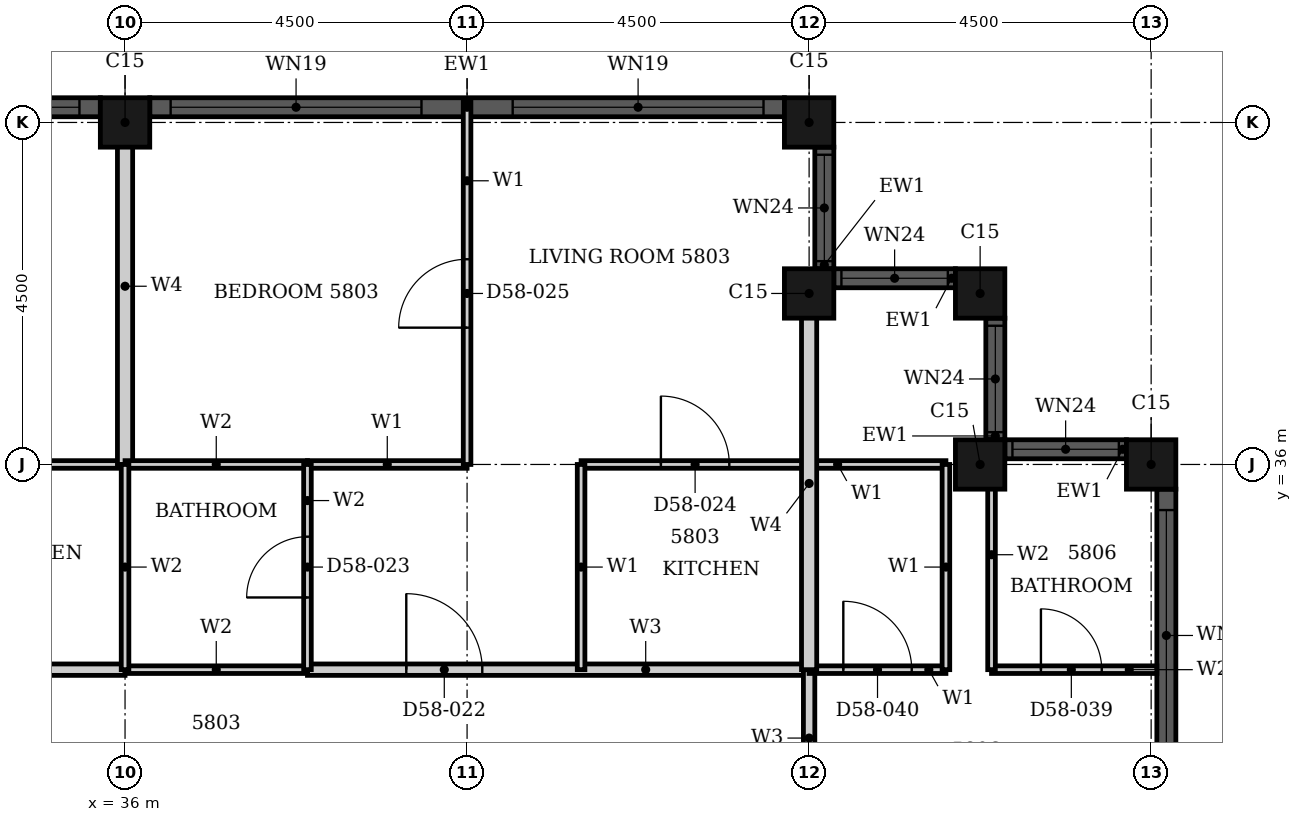
"""IFC4 building model, lengths in metres.
Left out: names, types, materials, properties, quantities, classifications, styles, units other than length and angle.
Written with IfcOpenShell. Run it as: python <this file> out.ifc"""

import sys

from ifc_helpers import new_model, si_unit, direction, frame, frame_2d, origin, origin_2d, place, context, subcontext, project, spatial, rectangle, hollow_rectangle, extrude, element, fill, save


model = new_model("IFC4")
c1 = context("Model", 3, precision=1e-05, world=origin(), true_north=direction((0.0, 1.0)))
c2 = subcontext(c1, "Body", "Model", "MODEL_VIEW")
j1 = project(units=[si_unit("LENGTHUNIT", "METRE"), si_unit("PLANEANGLEUNIT", "RADIAN")], contexts=[c1])
p1 = place(None, origin())
s1 = spatial("IfcSite", under=j1, at=p1, CompositionType="ELEMENT")
p2 = place(p1, origin())
s2 = spatial("IfcBuilding", under=s1, at=p2, CompositionType="ELEMENT")
p3 = place(p2, frame((0.0, 0.0, 229.4)))
s3 = spatial("IfcBuildingStorey", under=s2, at=p3, CompositionType="ELEMENT", Elevation=229.4)
for number, where, z_axis, x_axis in (
    (1, (49.5, 36.0, 0.0), (0.0, 0.0, 1.0), (1.0, 0.0, 0.0)),
    (2, (47.25, 36.0, 0.0), (0.0, 0.0, 1.0), (1.0, 0.0, 0.0)),
    (3, (47.25, 38.25, 0.0), (0.0, 0.0, 1.0), (1.0, 0.0, 0.0)),
    (4, (45.0, 38.25, 0.0), (0.0, 0.0, 1.0), (1.0, 0.0, 0.0)),
    (5, (45.0, 40.5, 0.0), (0.0, 0.0, 1.0), (1.0, 0.0, 0.0)),
    (6, (36.0, 40.5, 0.0), (0.0, 0.0, 1.0), (1.0, 0.0, 0.0)),
):
    element("IfcColumn", number, at=place(p3, frame(where, z_axis=z_axis, x_axis=x_axis)), inside=s3, PredefinedType="COLUMN", context=c2, shape_type="SweptSolid", body=[
        extrude(hollow_rectangle(XDim=0.65, YDim=0.65, WallThickness=0.021, at=origin_2d()), origin(), (0.0, 0.0, 1.0), 3.7),
    ])
p4 = place(p3, frame((49.7, 27.325, 0.0), z_axis=(0.0, 0.0, 1.0), x_axis=(0.0, 1.0, 0.0)))
e7 = element("IfcWall", 7, at=p4, inside=s3, PredefinedType="SOLIDWALL", context=c2, shape_type="SweptSolid", body=[
    extrude(rectangle(XDim=8.35, YDim=0.25, at=frame_2d((4.175, 0.0))), origin(), (0.0, 0.0, 1.0), 3.7),
])
p5 = place(p4, frame((0.275, 0.0, 0.45)))
e8 = element("IfcOpeningElement", 8, at=p5, cuts=e7, PredefinedType="OPENING", context=c2, shape_type="SweptSolid", body=[
    extrude(rectangle(XDim=3.3, YDim=2.2, at=frame_2d((1.65, 1.1))), frame((0.0, 0.135, 0.0), z_axis=(0.0, -1.0, 0.0), x_axis=(1.0, 0.0, 0.0)), (0.0, 0.0, 1.0), 0.27),
])
p6 = place(p4, frame((4.775, 0.0, 0.45)))
e9 = element("IfcOpeningElement", 9, at=p6, cuts=e7, PredefinedType="OPENING", context=c2, shape_type="SweptSolid", body=[
    extrude(rectangle(XDim=3.3, YDim=2.2, at=frame_2d((1.65, 1.1))), frame((0.0, 0.135, 0.0), z_axis=(0.0, -1.0, 0.0), x_axis=(1.0, 0.0, 0.0)), (0.0, 0.0, 1.0), 0.27),
])
p7 = place(p3, frame((49.175, 36.2, 0.0), z_axis=(0.0, 0.0, 1.0), x_axis=(-1.0, 0.0, 0.0)))
e10 = element("IfcWall", 10, at=p7, inside=s3, PredefinedType="SOLIDWALL", context=c2, shape_type="SweptSolid", body=[
    extrude(rectangle(XDim=1.6, YDim=0.25, at=frame_2d((0.8, 0.0))), origin(), (0.0, 0.0, 1.0), 3.7),
])
p8 = place(p7, frame((0.1, 0.0, 0.9)))
e11 = element("IfcOpeningElement", 11, at=p8, cuts=e10, PredefinedType="OPENING", context=c2, shape_type="SweptSolid", body=[
    extrude(rectangle(XDim=1.4, YDim=1.75, at=frame_2d((0.7, 0.875))), frame((0.0, 0.135, 0.0), z_axis=(0.0, -1.0, 0.0), x_axis=(1.0, 0.0, 0.0)), (0.0, 0.0, 1.0), 0.27),
])
p9 = place(p3, frame((47.45, 36.325, 0.0), z_axis=(0.0, 0.0, 1.0), x_axis=(0.0, 1.0, 0.0)))
e12 = element("IfcWall", 12, at=p9, inside=s3, PredefinedType="SOLIDWALL", context=c2, shape_type="SweptSolid", body=[
    extrude(rectangle(XDim=1.6, YDim=0.25, at=frame_2d((0.8, 0.0))), origin(), (0.0, 0.0, 1.0), 3.7),
])
p10 = place(p9, frame((0.1, 0.0, 0.9)))
e13 = element("IfcOpeningElement", 13, at=p10, cuts=e12, PredefinedType="OPENING", context=c2, shape_type="SweptSolid", body=[
    extrude(rectangle(XDim=1.4, YDim=1.75, at=frame_2d((0.7, 0.875))), frame((0.0, 0.135, 0.0), z_axis=(0.0, -1.0, 0.0), x_axis=(1.0, 0.0, 0.0)), (0.0, 0.0, 1.0), 0.27),
])
p11 = place(p3, frame((46.925, 38.45, 0.0), z_axis=(0.0, 0.0, 1.0), x_axis=(-1.0, 0.0, 0.0)))
e14 = element("IfcWall", 14, at=p11, inside=s3, PredefinedType="SOLIDWALL", context=c2, shape_type="SweptSolid", body=[
    extrude(rectangle(XDim=1.6, YDim=0.25, at=frame_2d((0.8, 0.0))), origin(), (0.0, 0.0, 1.0), 3.7),
])
p12 = place(p11, frame((0.1, 0.0, 0.9)))
e15 = element("IfcOpeningElement", 15, at=p12, cuts=e14, PredefinedType="OPENING", context=c2, shape_type="SweptSolid", body=[
    extrude(rectangle(XDim=1.4, YDim=1.75, at=frame_2d((0.7, 0.875))), frame((0.0, 0.135, 0.0), z_axis=(0.0, -1.0, 0.0), x_axis=(1.0, 0.0, 0.0)), (0.0, 0.0, 1.0), 0.27),
])
p13 = place(p3, frame((45.2, 38.575, 0.0), z_axis=(0.0, 0.0, 1.0), x_axis=(0.0, 1.0, 0.0)))
e16 = element("IfcWall", 16, at=p13, inside=s3, PredefinedType="SOLIDWALL", context=c2, shape_type="SweptSolid", body=[
    extrude(rectangle(XDim=1.6, YDim=0.25, at=frame_2d((0.8, 0.0))), origin(), (0.0, 0.0, 1.0), 3.7),
])
p14 = place(p13, frame((0.1, 0.0, 0.9)))
e17 = element("IfcOpeningElement", 17, at=p14, cuts=e16, PredefinedType="OPENING", context=c2, shape_type="SweptSolid", body=[
    extrude(rectangle(XDim=1.4, YDim=1.75, at=frame_2d((0.7, 0.875))), frame((0.0, 0.135, 0.0), z_axis=(0.0, -1.0, 0.0), x_axis=(1.0, 0.0, 0.0)), (0.0, 0.0, 1.0), 0.27),
])
p15 = place(p3, frame((44.675, 40.7, 0.0), z_axis=(0.0, 0.0, 1.0), x_axis=(-1.0, 0.0, 0.0)))
e18 = element("IfcWall", 18, at=p15, inside=s3, PredefinedType="SOLIDWALL", context=c2, shape_type="SweptSolid", body=[
    extrude(rectangle(XDim=8.35, YDim=0.25, at=frame_2d((4.175, 0.0))), origin(), (0.0, 0.0, 1.0), 3.7),
])
p16 = place(p15, frame((0.275, 0.0, 0.45)))
e19 = element("IfcOpeningElement", 19, at=p16, cuts=e18, PredefinedType="OPENING", context=c2, shape_type="SweptSolid", body=[
    extrude(rectangle(XDim=3.3, YDim=2.2, at=frame_2d((1.65, 1.1))), frame((0.0, 0.135, 0.0), z_axis=(0.0, -1.0, 0.0), x_axis=(1.0, 0.0, 0.0)), (0.0, 0.0, 1.0), 0.27),
])
p17 = place(p15, frame((4.775, 0.0, 0.45)))
e20 = element("IfcOpeningElement", 20, at=p17, cuts=e18, PredefinedType="OPENING", context=c2, shape_type="SweptSolid", body=[
    extrude(rectangle(XDim=3.3, YDim=2.2, at=frame_2d((1.65, 1.1))), frame((0.0, 0.135, 0.0), z_axis=(0.0, -1.0, 0.0), x_axis=(1.0, 0.0, 0.0)), (0.0, 0.0, 1.0), 0.27),
])
p18 = place(p3, frame((35.675, 40.7, 0.0), z_axis=(0.0, 0.0, 1.0), x_axis=(-1.0, 0.0, 0.0)))
e21 = element("IfcWall", 21, at=p18, inside=s3, PredefinedType="SOLIDWALL", context=c2, shape_type="SweptSolid", body=[
    extrude(rectangle(XDim=8.35, YDim=0.25, at=frame_2d((4.175, 0.0))), origin(), (0.0, 0.0, 1.0), 3.7),
])
p19 = place(p18, frame((0.275, 0.0, 0.45)))
e22 = element("IfcOpeningElement", 22, at=p19, cuts=e21, PredefinedType="OPENING", context=c2, shape_type="SweptSolid", body=[
    extrude(rectangle(XDim=3.3, YDim=2.2, at=frame_2d((1.65, 1.1))), frame((0.0, 0.135, 0.0), z_axis=(0.0, -1.0, 0.0), x_axis=(1.0, 0.0, 0.0)), (0.0, 0.0, 1.0), 0.27),
])
p20 = place(p18, frame((4.775, 0.0, 0.45)))
e23 = element("IfcOpeningElement", 23, at=p20, cuts=e21, PredefinedType="OPENING", context=c2, shape_type="SweptSolid", body=[
    extrude(rectangle(XDim=3.3, YDim=2.2, at=frame_2d((1.65, 1.1))), frame((0.0, 0.135, 0.0), z_axis=(0.0, -1.0, 0.0), x_axis=(1.0, 0.0, 0.0)), (0.0, 0.0, 1.0), 0.27),
])
p21 = place(p3, frame((29.4, 33.3, 0.0), z_axis=(0.0, 0.0, 1.0), x_axis=(1.0, 0.0, 0.0)))
e24 = element("IfcWall", 24, at=p21, inside=s3, PredefinedType="PARTITIONING", context=c2, shape_type="SweptSolid", body=[
    extrude(rectangle(XDim=6.6, YDim=0.15, at=frame_2d((3.3, 0.0))), origin(), (0.0, 0.0, 1.0), 3.3),
])
p22 = place(p21, frame((1.3, 0.0, 0.0)))
e25 = element("IfcOpeningElement", 25, at=p22, cuts=e24, PredefinedType="OPENING", context=c2, shape_type="SweptSolid", body=[
    extrude(rectangle(XDim=1.0, YDim=2.2, at=frame_2d((0.5, 1.1))), frame((0.0, 0.085, 0.0), z_axis=(0.0, -1.0, 0.0), x_axis=(1.0, 0.0, 0.0)), (0.0, 0.0, 1.0), 0.17),
])
p23 = place(p3, frame((38.4, 33.3, 0.0), z_axis=(0.0, 0.0, 1.0), x_axis=(1.0, 0.0, 0.0)))
e26 = element("IfcWall", 26, at=p23, inside=s3, PredefinedType="PARTITIONING", context=c2, shape_type="SweptSolid", body=[
    extrude(rectangle(XDim=6.6, YDim=0.15, at=frame_2d((3.3, 0.0))), origin(), (0.0, 0.0, 1.0), 3.3),
])
p24 = place(p23, frame((1.3, 0.0, 0.0)))
e27 = element("IfcOpeningElement", 27, at=p24, cuts=e26, PredefinedType="OPENING", context=c2, shape_type="SweptSolid", body=[
    extrude(rectangle(XDim=1.0, YDim=2.2, at=frame_2d((0.5, 1.1))), frame((0.0, 0.085, 0.0), z_axis=(0.0, -1.0, 0.0), x_axis=(1.0, 0.0, 0.0)), (0.0, 0.0, 1.0), 0.17),
])
p25 = place(p3, frame((45.0, 31.5, 0.0), z_axis=(0.0, 0.0, 1.0), x_axis=(0.0, 1.0, 0.0)))
e28 = element("IfcWall", 28, at=p25, inside=s3, PredefinedType="PARTITIONING", context=c2, shape_type="SweptSolid", body=[
    extrude(rectangle(XDim=1.8, YDim=0.15, at=frame_2d((0.9, 0.0))), origin(), (0.0, 0.0, 1.0), 3.3),
])
p26 = place(p3, frame((45.0, 33.3, 0.0), z_axis=(0.0, 0.0, 1.0), x_axis=(1.0, 0.0, 0.0)))
e29 = element("IfcWall", 29, at=p26, inside=s3, PredefinedType="PARTITIONING", context=c2, shape_type="SweptSolid", body=[
    extrude(rectangle(XDim=1.8, YDim=0.1, at=frame_2d((0.9, 0.0))), origin(), (0.0, 0.0, 1.0), 3.3),
])
p27 = place(p26, frame((0.45, 0.0, 0.0)))
e30 = element("IfcOpeningElement", 30, at=p27, cuts=e29, PredefinedType="OPENING", context=c2, shape_type="SweptSolid", body=[
    extrude(rectangle(XDim=0.9, YDim=2.1, at=frame_2d((0.45, 1.05))), frame((0.0, 0.06, 0.0), z_axis=(0.0, -1.0, 0.0), x_axis=(1.0, 0.0, 0.0)), (0.0, 0.0, 1.0), 0.12),
])
p28 = place(p3, frame((33.0, 36.0, 0.0), z_axis=(0.0, 0.0, 1.0), x_axis=(1.0, 0.0, 0.0)))
e31 = element("IfcWall", 31, at=p28, inside=s3, PredefinedType="PARTITIONING", context=c2, shape_type="SweptSolid", body=[
    extrude(rectangle(XDim=3.0, YDim=0.1, at=frame_2d((1.5, 0.0))), origin(), (0.0, 0.0, 1.0), 3.3),
])
p29 = place(p28, frame((1.05, 0.0, 0.0)))
e32 = element("IfcOpeningElement", 32, at=p29, cuts=e31, PredefinedType="OPENING", context=c2, shape_type="SweptSolid", body=[
    extrude(rectangle(XDim=0.9, YDim=2.1, at=frame_2d((0.45, 1.05))), frame((0.0, 0.06, 0.0), z_axis=(0.0, -1.0, 0.0), x_axis=(1.0, 0.0, 0.0)), (0.0, 0.0, 1.0), 0.12),
])
p30 = place(p3, frame((38.4, 36.0, 0.0), z_axis=(0.0, 0.0, 1.0), x_axis=(1.0, 0.0, 0.0)))
e33 = element("IfcWall", 33, at=p30, inside=s3, PredefinedType="PARTITIONING", context=c2, shape_type="SweptSolid", body=[
    extrude(rectangle(XDim=2.1, YDim=0.1, at=frame_2d((1.05, 0.0))), origin(), (0.0, 0.0, 1.0), 3.3),
])
p31 = place(p3, frame((42.0, 36.0, 0.0), z_axis=(0.0, 0.0, 1.0), x_axis=(1.0, 0.0, 0.0)))
e34 = element("IfcWall", 34, at=p31, inside=s3, PredefinedType="PARTITIONING", context=c2, shape_type="SweptSolid", body=[
    extrude(rectangle(XDim=4.8, YDim=0.1, at=frame_2d((2.4, 0.0))), origin(), (0.0, 0.0, 1.0), 3.3),
])
p32 = place(p31, frame((1.05, 0.0, 0.0)))
e35 = element("IfcOpeningElement", 35, at=p32, cuts=e34, PredefinedType="OPENING", context=c2, shape_type="SweptSolid", body=[
    extrude(rectangle(XDim=0.9, YDim=2.1, at=frame_2d((0.45, 1.05))), frame((0.0, 0.06, 0.0), z_axis=(0.0, -1.0, 0.0), x_axis=(1.0, 0.0, 0.0)), (0.0, 0.0, 1.0), 0.12),
])
p33 = place(p3, frame((40.5, 36.0, 0.0), z_axis=(0.0, 0.0, 1.0), x_axis=(0.0, 1.0, 0.0)))
e36 = element("IfcWall", 36, at=p33, inside=s3, PredefinedType="PARTITIONING", context=c2, shape_type="SweptSolid", body=[
    extrude(rectangle(XDim=4.765, YDim=0.1, at=frame_2d((2.382, 0.0))), origin(), (0.0, 0.0, 1.0), 3.3),
])
p34 = place(p33, frame((1.8, 0.0, 0.0)))
e37 = element("IfcOpeningElement", 37, at=p34, cuts=e36, PredefinedType="OPENING", context=c2, shape_type="SweptSolid", body=[
    extrude(rectangle(XDim=0.9, YDim=2.1, at=frame_2d((0.45, 1.05))), frame((0.0, 0.06, 0.0), z_axis=(0.0, -1.0, 0.0), x_axis=(1.0, 0.0, 0.0)), (0.0, 0.0, 1.0), 0.12),
])
for number, where, z_axis, x_axis in (
    (38, (42.0, 33.3, 0.0), (0.0, 0.0, 1.0), (0.0, 1.0, 0.0)),
    (39, (46.8, 33.3, 0.0), (0.0, 0.0, 1.0), (0.0, 1.0, 0.0)),
):
    element("IfcWall", number, at=place(p3, frame(where, z_axis=z_axis, x_axis=x_axis)), inside=s3, PredefinedType="PARTITIONING", context=c2, shape_type="SweptSolid", body=[
        extrude(rectangle(XDim=2.7, YDim=0.1, at=frame_2d((1.35, 0.0))), origin(), (0.0, 0.0, 1.0), 3.3),
    ])
p35 = place(p3, frame((36.0, 36.0, 0.0), z_axis=(0.0, 0.0, 1.0), x_axis=(0.0, 1.0, 0.0)))
e40 = element("IfcWall", 40, at=p35, inside=s3, PredefinedType="PARTITIONING", context=c2, shape_type="SweptSolid", body=[
    extrude(rectangle(XDim=4.69, YDim=0.2, at=frame_2d((2.345, 0.0))), origin(), (0.0, 0.0, 1.0), 3.3),
])
p36 = place(p3, frame((45.0, 33.3, 0.0), z_axis=(0.0, 0.0, 1.0), x_axis=(0.0, 1.0, 0.0)))
e41 = element("IfcWall", 41, at=p36, inside=s3, PredefinedType="PARTITIONING", context=c2, shape_type="SweptSolid", body=[
    extrude(rectangle(XDim=4.9, YDim=0.2, at=frame_2d((2.45, 0.0))), origin(), (0.0, 0.0, 1.0), 3.3),
])
p37 = place(p3, frame((36.0, 33.3, 0.0), z_axis=(0.0, 0.0, 1.0), x_axis=(1.0, 0.0, 0.0)))
e42 = element("IfcWall", 42, at=p37, inside=s3, PredefinedType="PARTITIONING", context=c2, shape_type="SweptSolid", body=[
    extrude(rectangle(XDim=2.4, YDim=0.1, at=frame_2d((1.2, 0.0))), origin(), (0.0, 0.0, 1.0), 3.3),
])
p38 = place(p3, frame((47.4, 33.3, 0.0), z_axis=(0.0, 0.0, 1.0), x_axis=(1.0, 0.0, 0.0)))
e43 = element("IfcWall", 43, at=p38, inside=s3, PredefinedType="PARTITIONING", context=c2, shape_type="SweptSolid", body=[
    extrude(rectangle(XDim=2.175, YDim=0.1, at=frame_2d((1.087, 0.0))), origin(), (0.0, 0.0, 1.0), 3.3),
])
p39 = place(p38, frame((0.65, 0.0, 0.0)))
e44 = element("IfcOpeningElement", 44, at=p39, cuts=e43, PredefinedType="OPENING", context=c2, shape_type="SweptSolid", body=[
    extrude(rectangle(XDim=0.8, YDim=2.1, at=frame_2d((0.4, 1.05))), frame((0.0, 0.06, 0.0), z_axis=(0.0, -1.0, 0.0), x_axis=(1.0, 0.0, 0.0)), (0.0, 0.0, 1.0), 0.12),
])
p40 = place(p3, frame((36.0, 36.0, 0.0), z_axis=(0.0, 0.0, 1.0), x_axis=(1.0, 0.0, 0.0)))
e45 = element("IfcWall", 45, at=p40, inside=s3, PredefinedType="PARTITIONING", context=c2, shape_type="SweptSolid", body=[
    extrude(rectangle(XDim=2.4, YDim=0.1, at=frame_2d((1.2, 0.0))), origin(), (0.0, 0.0, 1.0), 3.3),
])
p41 = place(p3, frame((36.0, 33.3, 0.0), z_axis=(0.0, 0.0, 1.0), x_axis=(0.0, 1.0, 0.0)))
e46 = element("IfcWall", 46, at=p41, inside=s3, PredefinedType="PARTITIONING", context=c2, shape_type="SweptSolid", body=[
    extrude(rectangle(XDim=2.7, YDim=0.1, at=frame_2d((1.35, 0.0))), origin(), (0.0, 0.0, 1.0), 3.3),
])
p42 = place(p3, frame((38.4, 33.3, 0.0), z_axis=(0.0, 0.0, 1.0), x_axis=(0.0, 1.0, 0.0)))
e47 = element("IfcWall", 47, at=p42, inside=s3, PredefinedType="PARTITIONING", context=c2, shape_type="SweptSolid", body=[
    extrude(rectangle(XDim=2.7, YDim=0.1, at=frame_2d((1.35, 0.0))), origin(), (0.0, 0.0, 1.0), 3.3),
])
p43 = place(p42, frame((0.95, 0.0, 0.0)))
e48 = element("IfcOpeningElement", 48, at=p43, cuts=e47, PredefinedType="OPENING", context=c2, shape_type="SweptSolid", body=[
    extrude(rectangle(XDim=0.8, YDim=2.1, at=frame_2d((0.4, 1.05))), frame((0.0, 0.06, 0.0), z_axis=(0.0, -1.0, 0.0), x_axis=(1.0, 0.0, 0.0)), (0.0, 0.0, 1.0), 0.12),
])
p44 = place(p3, frame((47.4, 33.3, 0.0), z_axis=(0.0, 0.0, 1.0), x_axis=(0.0, 1.0, 0.0)))
e49 = element("IfcWall", 49, at=p44, inside=s3, PredefinedType="PARTITIONING", context=c2, shape_type="SweptSolid", body=[
    extrude(rectangle(XDim=3.025, YDim=0.1, at=frame_2d((1.512, 0.0))), origin(), (0.0, 0.0, 1.0), 3.3),
])
p45 = place(p6, origin())
e50 = element("IfcWindow", 50, at=p45, inside=s3, PartitioningType="SINGLE_PANEL", PredefinedType="WINDOW", context=c2, shape_type="SweptSolid", body=[
    extrude(rectangle(XDim=3.3, YDim=2.2, at=frame_2d((1.65, 1.1))), frame((0.0, 0.03, 0.0), z_axis=(0.0, -1.0, 0.0), x_axis=(1.0, 0.0, 0.0)), (0.0, 0.0, 1.0), 0.06),
])
fill(e9, e50)
p46 = place(p8, origin())
e51 = element("IfcWindow", 51, at=p46, inside=s3, PartitioningType="SINGLE_PANEL", PredefinedType="WINDOW", context=c2, shape_type="SweptSolid", body=[
    extrude(rectangle(XDim=1.4, YDim=1.75, at=frame_2d((0.7, 0.875))), frame((0.0, 0.03, 0.0), z_axis=(0.0, -1.0, 0.0), x_axis=(1.0, 0.0, 0.0)), (0.0, 0.0, 1.0), 0.06),
])
fill(e11, e51)
p47 = place(p10, origin())
e52 = element("IfcWindow", 52, at=p47, inside=s3, PartitioningType="SINGLE_PANEL", PredefinedType="WINDOW", context=c2, shape_type="SweptSolid", body=[
    extrude(rectangle(XDim=1.4, YDim=1.75, at=frame_2d((0.7, 0.875))), frame((0.0, 0.03, 0.0), z_axis=(0.0, -1.0, 0.0), x_axis=(1.0, 0.0, 0.0)), (0.0, 0.0, 1.0), 0.06),
])
fill(e13, e52)
p48 = place(p12, origin())
e53 = element("IfcWindow", 53, at=p48, inside=s3, PartitioningType="SINGLE_PANEL", PredefinedType="WINDOW", context=c2, shape_type="SweptSolid", body=[
    extrude(rectangle(XDim=1.4, YDim=1.75, at=frame_2d((0.7, 0.875))), frame((0.0, 0.03, 0.0), z_axis=(0.0, -1.0, 0.0), x_axis=(1.0, 0.0, 0.0)), (0.0, 0.0, 1.0), 0.06),
])
fill(e15, e53)
p49 = place(p14, origin())
e54 = element("IfcWindow", 54, at=p49, inside=s3, PartitioningType="SINGLE_PANEL", PredefinedType="WINDOW", context=c2, shape_type="SweptSolid", body=[
    extrude(rectangle(XDim=1.4, YDim=1.75, at=frame_2d((0.7, 0.875))), frame((0.0, 0.03, 0.0), z_axis=(0.0, -1.0, 0.0), x_axis=(1.0, 0.0, 0.0)), (0.0, 0.0, 1.0), 0.06),
])
fill(e17, e54)
p50 = place(p16, origin())
e55 = element("IfcWindow", 55, at=p50, inside=s3, PartitioningType="SINGLE_PANEL", PredefinedType="WINDOW", context=c2, shape_type="SweptSolid", body=[
    extrude(rectangle(XDim=3.3, YDim=2.2, at=frame_2d((1.65, 1.1))), frame((0.0, 0.03, 0.0), z_axis=(0.0, -1.0, 0.0), x_axis=(1.0, 0.0, 0.0)), (0.0, 0.0, 1.0), 0.06),
])
fill(e19, e55)
p51 = place(p17, origin())
e56 = element("IfcWindow", 56, at=p51, inside=s3, PartitioningType="SINGLE_PANEL", PredefinedType="WINDOW", context=c2, shape_type="SweptSolid", body=[
    extrude(rectangle(XDim=3.3, YDim=2.2, at=frame_2d((1.65, 1.1))), frame((0.0, 0.03, 0.0), z_axis=(0.0, -1.0, 0.0), x_axis=(1.0, 0.0, 0.0)), (0.0, 0.0, 1.0), 0.06),
])
fill(e20, e56)
p52 = place(p19, origin())
e57 = element("IfcWindow", 57, at=p52, inside=s3, PartitioningType="SINGLE_PANEL", PredefinedType="WINDOW", context=c2, shape_type="SweptSolid", body=[
    extrude(rectangle(XDim=3.3, YDim=2.2, at=frame_2d((1.65, 1.1))), frame((0.0, 0.03, 0.0), z_axis=(0.0, -1.0, 0.0), x_axis=(1.0, 0.0, 0.0)), (0.0, 0.0, 1.0), 0.06),
])
fill(e22, e57)
p53 = place(p24, origin())
e58 = element("IfcDoor", 58, at=p53, inside=s3, OperationType="SINGLE_SWING_RIGHT", PredefinedType="DOOR", context=c2, shape_type="SweptSolid", body=[
    extrude(rectangle(XDim=1.0, YDim=2.2, at=frame_2d((0.5, 1.1))), frame((0.0, 0.025, 0.0), z_axis=(0.0, -1.0, 0.0), x_axis=(1.0, 0.0, 0.0)), (0.0, 0.0, 1.0), 0.05),
])
fill(e27, e58)
p54 = place(p43, origin())
e59 = element("IfcDoor", 59, at=p54, inside=s3, OperationType="SINGLE_SWING_LEFT", PredefinedType="DOOR", context=c2, shape_type="SweptSolid", body=[
    extrude(rectangle(XDim=0.8, YDim=2.1, at=frame_2d((0.4, 1.05))), frame((0.0, 0.025, 0.0), z_axis=(0.0, -1.0, 0.0), x_axis=(1.0, 0.0, 0.0)), (0.0, 0.0, 1.0), 0.05),
])
fill(e48, e59)
p55 = place(p32, origin())
e60 = element("IfcDoor", 60, at=p55, inside=s3, OperationType="SINGLE_SWING_RIGHT", PredefinedType="DOOR", context=c2, shape_type="SweptSolid", body=[
    extrude(rectangle(XDim=0.9, YDim=2.1, at=frame_2d((0.45, 1.05))), frame((0.0, 0.025, 0.0), z_axis=(0.0, -1.0, 0.0), x_axis=(1.0, 0.0, 0.0)), (0.0, 0.0, 1.0), 0.05),
])
fill(e35, e60)
p56 = place(p34, origin())
e61 = element("IfcDoor", 61, at=p56, inside=s3, OperationType="SINGLE_SWING_RIGHT", PredefinedType="DOOR", context=c2, shape_type="SweptSolid", body=[
    extrude(rectangle(XDim=0.9, YDim=2.1, at=frame_2d((0.45, 1.05))), frame((0.0, 0.025, 0.0), z_axis=(0.0, -1.0, 0.0), x_axis=(1.0, 0.0, 0.0)), (0.0, 0.0, 1.0), 0.05),
])
fill(e37, e61)
p57 = place(p39, origin())
e62 = element("IfcDoor", 62, at=p57, inside=s3, OperationType="SINGLE_SWING_LEFT", PredefinedType="DOOR", context=c2, shape_type="SweptSolid", body=[
    extrude(rectangle(XDim=0.8, YDim=2.1, at=frame_2d((0.4, 1.05))), frame((0.0, 0.025, 0.0), z_axis=(0.0, -1.0, 0.0), x_axis=(1.0, 0.0, 0.0)), (0.0, 0.0, 1.0), 0.05),
])
fill(e44, e62)
p58 = place(p27, origin())
e63 = element("IfcDoor", 63, at=p58, inside=s3, OperationType="SINGLE_SWING_RIGHT", PredefinedType="DOOR", context=c2, shape_type="SweptSolid", body=[
    extrude(rectangle(XDim=0.9, YDim=2.1, at=frame_2d((0.45, 1.05))), frame((0.0, 0.025, 0.0), z_axis=(0.0, -1.0, 0.0), x_axis=(1.0, 0.0, 0.0)), (0.0, 0.0, 1.0), 0.05),
])
fill(e30, e63)
save(model, sys.argv[1])
